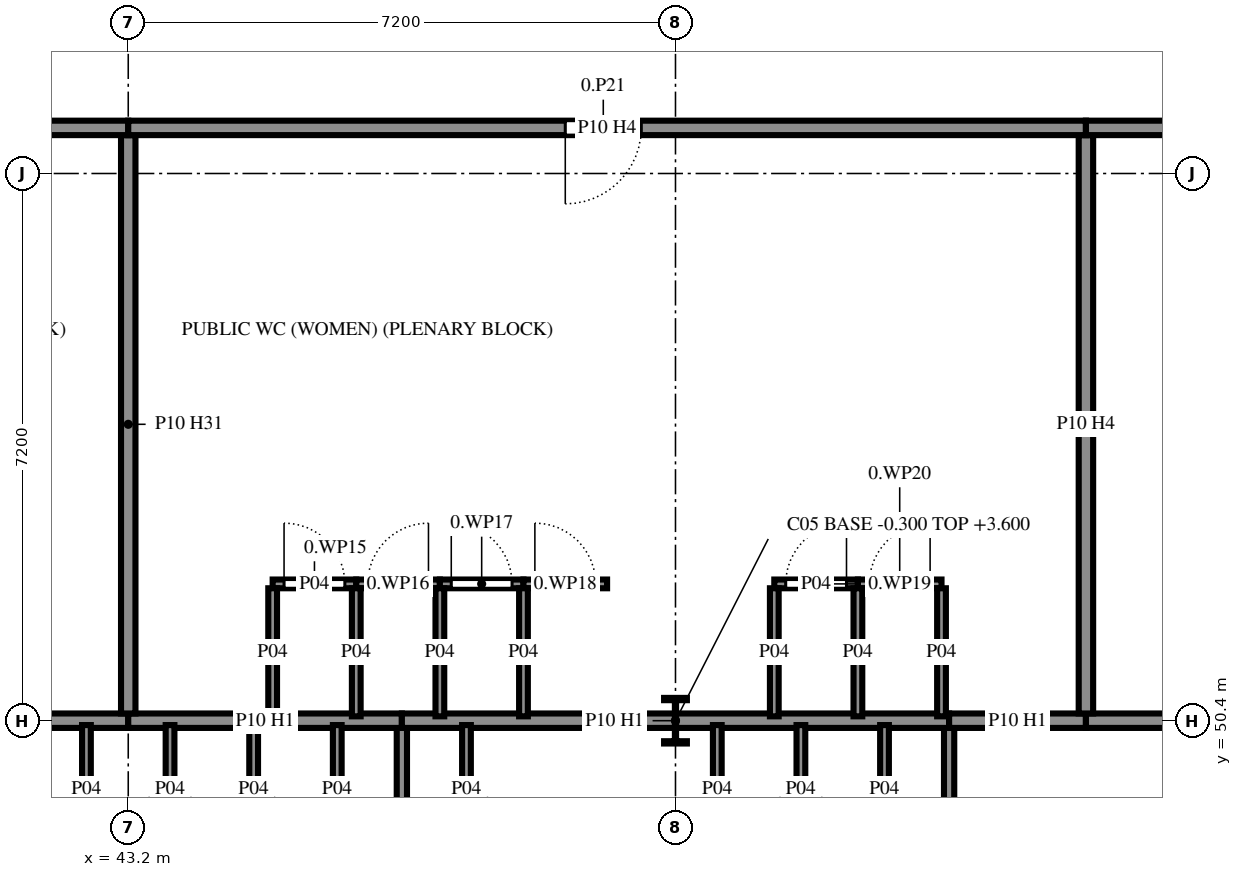
"""IFC4 building model, lengths in metres.
Left out: names, types, materials, properties, quantities, classifications, styles, units other than length and angle.
Written with IfcOpenShell. Run it as: python <this file> out.ifc"""

import sys

from ifc_helpers import new_model, si_unit, direction, frame, frame_2d, origin, origin_2d, place, context, subcontext, project, spatial, rectangle, i_section, extrude, element, fill, save


model = new_model("IFC4")
c1 = context("Model", 3, precision=1e-05, world=origin(), true_north=direction((0.0, 1.0)))
c2 = subcontext(c1, "Body", "Model", "MODEL_VIEW")
j1 = project(units=[si_unit("LENGTHUNIT", "METRE"), si_unit("PLANEANGLEUNIT", "RADIAN")], contexts=[c1])
p1 = place(None, origin())
s1 = spatial("IfcSite", under=j1, at=p1, CompositionType="ELEMENT")
p2 = place(p1, origin())
s2 = spatial("IfcBuilding", under=s1, at=p2, CompositionType="ELEMENT")
p3 = place(p2, origin())
s3 = spatial("IfcBuildingStorey", under=s2, at=p3, CompositionType="ELEMENT", Elevation=0.0)
p4 = place(p3, frame((50.4, 50.4, -0.3), z_axis=(0.0, 0.0, 1.0), x_axis=(1.0, 0.0, 0.0)))
e1 = element("IfcColumn", 1, at=p4, inside=s3, PredefinedType="COLUMN", context=c2, shape_type="SweptSolid", body=[
    extrude(i_section(OverallWidth=0.3, OverallDepth=0.6, WebThickness=0.015, FlangeThickness=0.03, FilletRadius=0.027, at=origin_2d()), origin(), (0.0, 0.0, 1.0), 3.9),
])
p5 = place(p3, frame((46.8, 50.305, 0.0), z_axis=(0.0, 0.0, 1.0), x_axis=(0.0, -1.0, 0.0)))
e2 = element("IfcWall", 2, at=p5, inside=s3, PredefinedType="PARTITIONING", context=c2, shape_type="SweptSolid", body=[
    extrude(rectangle(XDim=7.037, YDim=0.135, at=frame_2d((3.519, 0.0))), origin(), (0.0, 0.0, 1.0), 3.12),
])
p6 = place(p3, frame((39.6, 50.4, 0.0), z_axis=(0.0, 0.0, 1.0), x_axis=(1.0, 0.0, 0.0)))
e3 = element("IfcWall", 3, at=p6, inside=s3, PredefinedType="PARTITIONING", context=c2, shape_type="SweptSolid", body=[
    extrude(rectangle(XDim=3.6, YDim=0.19, at=frame_2d((1.8, 0.0))), origin(), (0.0, 0.0, 1.0), 2.82),
])
p7 = place(p3, frame((43.2, 50.4, 0.0), z_axis=(0.0, 0.0, 1.0), x_axis=(1.0, 0.0, 0.0)))
e4 = element("IfcWall", 4, at=p7, inside=s3, PredefinedType="PARTITIONING", context=c2, shape_type="SweptSolid", body=[
    extrude(rectangle(XDim=3.6, YDim=0.19, at=frame_2d((1.8, 0.0))), origin(), (0.0, 0.0, 1.0), 2.82),
])
p8 = place(p3, frame((54.0, 50.305, 0.0), z_axis=(0.0, 0.0, 1.0), x_axis=(0.0, -1.0, 0.0)))
e5 = element("IfcWall", 5, at=p8, inside=s3, PredefinedType="PARTITIONING", context=c2, shape_type="SweptSolid", body=[
    extrude(rectangle(XDim=7.037, YDim=0.135, at=frame_2d((3.519, 0.0))), origin(), (0.0, 0.0, 1.0), 3.12),
])
p9 = place(p3, frame((46.8, 50.4, 0.0), z_axis=(0.0, 0.0, 1.0), x_axis=(1.0, 0.0, 0.0)))
e6 = element("IfcWall", 6, at=p9, inside=s3, PredefinedType="PARTITIONING", context=c2, shape_type="SweptSolid", body=[
    extrude(rectangle(XDim=7.2, YDim=0.19, at=frame_2d((3.6, 0.0))), origin(), (0.0, 0.0, 1.0), 2.82),
])
p10 = place(p3, frame((54.0, 50.4, 0.0), z_axis=(0.0, 0.0, 1.0), x_axis=(1.0, 0.0, 0.0)))
e7 = element("IfcWall", 7, at=p10, inside=s3, PredefinedType="PARTITIONING", context=c2, shape_type="SweptSolid", body=[
    extrude(rectangle(XDim=1.8, YDim=0.19, at=frame_2d((0.9, 0.0))), origin(), (0.0, 0.0, 1.0), 2.82),
])
p11 = place(p3, frame((55.8, 50.4, 0.0), z_axis=(0.0, 0.0, 1.0), x_axis=(1.0, 0.0, 0.0)))
e8 = element("IfcWall", 8, at=p11, inside=s3, PredefinedType="PARTITIONING", context=c2, shape_type="SweptSolid", body=[
    extrude(rectangle(XDim=5.4, YDim=0.19, at=frame_2d((2.7, 0.0))), origin(), (0.0, 0.0, 1.0), 2.82),
])
p12 = place(p3, frame((43.2, 58.105, 0.0), z_axis=(0.0, 0.0, 1.0), x_axis=(0.0, -1.0, 0.0)))
e9 = element("IfcWall", 9, at=p12, inside=s3, PredefinedType="PARTITIONING", context=c2, shape_type="SweptSolid", body=[
    extrude(rectangle(XDim=7.61, YDim=0.19, at=frame_2d((3.805, 0.0))), origin(), (0.0, 0.0, 1.0), 3.11),
])
p13 = place(p3, frame((30.6, 58.2, 0.0), z_axis=(0.0, 0.0, 1.0), x_axis=(1.0, 0.0, 0.0)))
e10 = element("IfcWall", 10, at=p13, inside=s3, PredefinedType="PARTITIONING", context=c2, shape_type="SweptSolid", body=[
    extrude(rectangle(XDim=12.6, YDim=0.19, at=frame_2d((6.3, 0.0))), origin(), (0.0, 0.0, 1.0), 3.42),
])
p14 = place(p13, frame((5.75, 0.0, 0.0)))
e11 = element("IfcOpeningElement", 11, at=p14, cuts=e10, PredefinedType="OPENING", context=c2, shape_type="SweptSolid", body=[
    extrude(rectangle(XDim=1.0, YDim=2.4, at=frame_2d((0.5, 1.2))), frame((0.0, 0.105, 0.0), z_axis=(0.0, -1.0, 0.0), x_axis=(1.0, 0.0, 0.0)), (0.0, 0.0, 1.0), 0.21),
])
p15 = place(p3, frame((55.8, 58.105, 0.0), z_axis=(0.0, 0.0, 1.0), x_axis=(0.0, -1.0, 0.0)))
e12 = element("IfcWall", 12, at=p15, inside=s3, PredefinedType="PARTITIONING", context=c2, shape_type="SweptSolid", body=[
    extrude(rectangle(XDim=7.61, YDim=0.19, at=frame_2d((3.805, 0.0))), origin(), (0.0, 0.0, 1.0), 3.42),
])
p16 = place(p3, frame((43.2, 58.2, 0.0), z_axis=(0.0, 0.0, 1.0), x_axis=(1.0, 0.0, 0.0)))
e13 = element("IfcWall", 13, at=p16, inside=s3, PredefinedType="PARTITIONING", context=c2, shape_type="SweptSolid", body=[
    extrude(rectangle(XDim=12.6, YDim=0.19, at=frame_2d((6.3, 0.0))), origin(), (0.0, 0.0, 1.0), 3.42),
])
p17 = place(p16, frame((5.75, 0.0, 0.0)))
e14 = element("IfcOpeningElement", 14, at=p17, cuts=e13, PredefinedType="OPENING", context=c2, shape_type="SweptSolid", body=[
    extrude(rectangle(XDim=1.0, YDim=2.4, at=frame_2d((0.5, 1.2))), frame((0.0, 0.105, 0.0), z_axis=(0.0, -1.0, 0.0), x_axis=(1.0, 0.0, 0.0)), (0.0, 0.0, 1.0), 0.21),
])
p18 = place(p3, frame((55.8, 58.2, 0.0), z_axis=(0.0, 0.0, 1.0), x_axis=(1.0, 0.0, 0.0)))
e15 = element("IfcWall", 15, at=p18, inside=s3, PredefinedType="PARTITIONING", context=c2, shape_type="SweptSolid", body=[
    extrude(rectangle(XDim=12.695, YDim=0.19, at=frame_2d((6.348, 0.0))), origin(), (0.0, 0.0, 1.0), 3.42),
])
p19 = place(p18, frame((5.85, 0.0, 0.0)))
e16 = element("IfcOpeningElement", 16, at=p19, cuts=e15, PredefinedType="OPENING", context=c2, shape_type="SweptSolid", body=[
    extrude(rectangle(XDim=1.0, YDim=2.4, at=frame_2d((0.5, 1.2))), frame((0.0, 0.105, 0.0), z_axis=(0.0, -1.0, 0.0), x_axis=(1.0, 0.0, 0.0)), (0.0, 0.0, 1.0), 0.21),
])
for number, where, z_axis, x_axis in (
    (17, (42.65, 50.343, 0.0), (0.0, 0.0, 1.0), (0.0, -1.0, 0.0)),
    (18, (43.75, 50.343, 0.0), (0.0, 0.0, 1.0), (0.0, -1.0, 0.0)),
    (19, (44.85, 50.343, 0.0), (0.0, 0.0, 1.0), (0.0, -1.0, 0.0)),
    (20, (45.95, 50.343, 0.0), (0.0, 0.0, 1.0), (0.0, -1.0, 0.0)),
    (21, (47.65, 50.343, 0.0), (0.0, 0.0, 1.0), (0.0, -1.0, 0.0)),
    (22, (50.95, 50.343, 0.0), (0.0, 0.0, 1.0), (0.0, -1.0, 0.0)),
    (23, (52.05, 50.343, 0.0), (0.0, 0.0, 1.0), (0.0, -1.0, 0.0)),
    (24, (53.15, 50.343, 0.0), (0.0, 0.0, 1.0), (0.0, -1.0, 0.0)),
):
    element("IfcWall", number, at=place(p3, frame(where, z_axis=z_axis, x_axis=x_axis)), inside=s3, PredefinedType="PARTITIONING", context=c2, shape_type="SweptSolid", body=[
        extrude(rectangle(XDim=1.685, YDim=0.115, at=frame_2d((0.843, 0.0))), origin(), (0.0, 0.0, 1.0), 3.42),
    ])
p20 = place(p3, frame((45.1, 52.2, 0.0), z_axis=(0.0, 0.0, 1.0), x_axis=(1.0, 0.0, 0.0)))
e25 = element("IfcWall", 25, at=p20, inside=s3, PredefinedType="PARTITIONING", context=c2, shape_type="SweptSolid", body=[
    extrude(rectangle(XDim=1.1, YDim=0.115, at=frame_2d((0.55, 0.0))), origin(), (0.0, 0.0, 1.0), 3.42),
])
p21 = place(p20, frame((0.15, 0.0, 0.0)))
e26 = element("IfcOpeningElement", 26, at=p21, cuts=e25, PredefinedType="OPENING", context=c2, shape_type="SweptSolid", body=[
    extrude(rectangle(XDim=0.8, YDim=2.1, at=frame_2d((0.4, 1.05))), frame((0.0, 0.067, 0.0), z_axis=(0.0, -1.0, 0.0), x_axis=(1.0, 0.0, 0.0)), (0.0, 0.0, 1.0), 0.135),
])
p22 = place(p3, frame((45.1, 50.458, 0.0), z_axis=(0.0, 0.0, 1.0), x_axis=(0.0, 1.0, 0.0)))
e27 = element("IfcWall", 27, at=p22, inside=s3, PredefinedType="PARTITIONING", context=c2, shape_type="SweptSolid", body=[
    extrude(rectangle(XDim=1.685, YDim=0.115, at=frame_2d((0.843, 0.0))), origin(), (0.0, 0.0, 1.0), 3.42),
])
p23 = place(p3, frame((46.2, 52.2, 0.0), z_axis=(0.0, 0.0, 1.0), x_axis=(1.0, 0.0, 0.0)))
e28 = element("IfcWall", 28, at=p23, inside=s3, PredefinedType="PARTITIONING", context=c2, shape_type="SweptSolid", body=[
    extrude(rectangle(XDim=1.1, YDim=0.115, at=frame_2d((0.55, 0.0))), origin(), (0.0, 0.0, 1.0), 3.42),
])
p24 = place(p23, frame((0.15, 0.0, 0.0)))
e29 = element("IfcOpeningElement", 29, at=p24, cuts=e28, PredefinedType="OPENING", context=c2, shape_type="SweptSolid", body=[
    extrude(rectangle(XDim=0.8, YDim=2.1, at=frame_2d((0.4, 1.05))), frame((0.0, 0.067, 0.0), z_axis=(0.0, -1.0, 0.0), x_axis=(1.0, 0.0, 0.0)), (0.0, 0.0, 1.0), 0.135),
])
p25 = place(p3, frame((46.2, 50.458, 0.0), z_axis=(0.0, 0.0, 1.0), x_axis=(0.0, 1.0, 0.0)))
e30 = element("IfcWall", 30, at=p25, inside=s3, PredefinedType="PARTITIONING", context=c2, shape_type="SweptSolid", body=[
    extrude(rectangle(XDim=1.685, YDim=0.115, at=frame_2d((0.843, 0.0))), origin(), (0.0, 0.0, 1.0), 3.42),
])
p26 = place(p3, frame((47.3, 52.2, 0.0), z_axis=(0.0, 0.0, 1.0), x_axis=(1.0, 0.0, 0.0)))
e31 = element("IfcWall", 31, at=p26, inside=s3, PredefinedType="PARTITIONING", context=c2, shape_type="SweptSolid", body=[
    extrude(rectangle(XDim=1.1, YDim=0.115, at=frame_2d((0.55, 0.0))), origin(), (0.0, 0.0, 1.0), 3.42),
])
p27 = place(p26, frame((0.15, 0.0, 0.0)))
e32 = element("IfcOpeningElement", 32, at=p27, cuts=e31, PredefinedType="OPENING", context=c2, shape_type="SweptSolid", body=[
    extrude(rectangle(XDim=0.8, YDim=2.1, at=frame_2d((0.4, 1.05))), frame((0.0, 0.067, 0.0), z_axis=(0.0, -1.0, 0.0), x_axis=(1.0, 0.0, 0.0)), (0.0, 0.0, 1.0), 0.135),
])
p28 = place(p3, frame((47.3, 50.458, 0.0), z_axis=(0.0, 0.0, 1.0), x_axis=(0.0, 1.0, 0.0)))
e33 = element("IfcWall", 33, at=p28, inside=s3, PredefinedType="PARTITIONING", context=c2, shape_type="SweptSolid", body=[
    extrude(rectangle(XDim=1.685, YDim=0.115, at=frame_2d((0.843, 0.0))), origin(), (0.0, 0.0, 1.0), 3.42),
])
p29 = place(p3, frame((48.4, 52.2, 0.0), z_axis=(0.0, 0.0, 1.0), x_axis=(1.0, 0.0, 0.0)))
e34 = element("IfcWall", 34, at=p29, inside=s3, PredefinedType="PARTITIONING", context=c2, shape_type="SweptSolid", body=[
    extrude(rectangle(XDim=1.1, YDim=0.115, at=frame_2d((0.55, 0.0))), origin(), (0.0, 0.0, 1.0), 3.42),
])
p30 = place(p29, frame((0.15, 0.0, 0.0)))
e35 = element("IfcOpeningElement", 35, at=p30, cuts=e34, PredefinedType="OPENING", context=c2, shape_type="SweptSolid", body=[
    extrude(rectangle(XDim=0.8, YDim=2.1, at=frame_2d((0.4, 1.05))), frame((0.0, 0.067, 0.0), z_axis=(0.0, -1.0, 0.0), x_axis=(1.0, 0.0, 0.0)), (0.0, 0.0, 1.0), 0.135),
])
p31 = place(p3, frame((48.4, 50.458, 0.0), z_axis=(0.0, 0.0, 1.0), x_axis=(0.0, 1.0, 0.0)))
e36 = element("IfcWall", 36, at=p31, inside=s3, PredefinedType="PARTITIONING", context=c2, shape_type="SweptSolid", body=[
    extrude(rectangle(XDim=1.685, YDim=0.115, at=frame_2d((0.843, 0.0))), origin(), (0.0, 0.0, 1.0), 3.42),
])
p32 = place(p3, frame((51.7, 52.2, 0.0), z_axis=(0.0, 0.0, 1.0), x_axis=(1.0, 0.0, 0.0)))
e37 = element("IfcWall", 37, at=p32, inside=s3, PredefinedType="PARTITIONING", context=c2, shape_type="SweptSolid", body=[
    extrude(rectangle(XDim=1.1, YDim=0.115, at=frame_2d((0.55, 0.0))), origin(), (0.0, 0.0, 1.0), 3.42),
])
p33 = place(p32, frame((0.15, 0.0, 0.0)))
e38 = element("IfcOpeningElement", 38, at=p33, cuts=e37, PredefinedType="OPENING", context=c2, shape_type="SweptSolid", body=[
    extrude(rectangle(XDim=0.8, YDim=2.1, at=frame_2d((0.4, 1.05))), frame((0.0, 0.067, 0.0), z_axis=(0.0, -1.0, 0.0), x_axis=(1.0, 0.0, 0.0)), (0.0, 0.0, 1.0), 0.135),
])
p34 = place(p3, frame((51.7, 50.458, 0.0), z_axis=(0.0, 0.0, 1.0), x_axis=(0.0, 1.0, 0.0)))
e39 = element("IfcWall", 39, at=p34, inside=s3, PredefinedType="PARTITIONING", context=c2, shape_type="SweptSolid", body=[
    extrude(rectangle(XDim=1.685, YDim=0.115, at=frame_2d((0.843, 0.0))), origin(), (0.0, 0.0, 1.0), 3.42),
])
p35 = place(p3, frame((52.8, 52.2, 0.0), z_axis=(0.0, 0.0, 1.0), x_axis=(1.0, 0.0, 0.0)))
e40 = element("IfcWall", 40, at=p35, inside=s3, PredefinedType="PARTITIONING", context=c2, shape_type="SweptSolid", body=[
    extrude(rectangle(XDim=1.1, YDim=0.115, at=frame_2d((0.55, 0.0))), origin(), (0.0, 0.0, 1.0), 3.42),
])
p36 = place(p35, frame((0.15, 0.0, 0.0)))
e41 = element("IfcOpeningElement", 41, at=p36, cuts=e40, PredefinedType="OPENING", context=c2, shape_type="SweptSolid", body=[
    extrude(rectangle(XDim=0.8, YDim=2.1, at=frame_2d((0.4, 1.05))), frame((0.0, 0.067, 0.0), z_axis=(0.0, -1.0, 0.0), x_axis=(1.0, 0.0, 0.0)), (0.0, 0.0, 1.0), 0.135),
])
for number, where, z_axis, x_axis in (
    (42, (52.8, 50.458, 0.0), (0.0, 0.0, 1.0), (0.0, 1.0, 0.0)),
    (43, (53.9, 50.458, 0.0), (0.0, 0.0, 1.0), (0.0, 1.0, 0.0)),
):
    element("IfcWall", number, at=place(p3, frame(where, z_axis=z_axis, x_axis=x_axis)), inside=s3, PredefinedType="PARTITIONING", context=c2, shape_type="SweptSolid", body=[
        extrude(rectangle(XDim=1.685, YDim=0.115, at=frame_2d((0.843, 0.0))), origin(), (0.0, 0.0, 1.0), 3.42),
    ])
p37 = place(p17, frame((1.0, 0.0, 0.0), z_axis=(0.0, 0.0, 1.0), x_axis=(-1.0, 0.0, 0.0)))
e44 = element("IfcDoor", 44, at=p37, inside=s3, OperationType="SINGLE_SWING_LEFT", PredefinedType="DOOR", context=c2, shape_type="SweptSolid", body=[
    extrude(rectangle(XDim=1.0, YDim=2.4, at=frame_2d((0.5, 1.2))), frame((0.0, 0.025, 0.0), z_axis=(0.0, -1.0, 0.0), x_axis=(1.0, 0.0, 0.0)), (0.0, 0.0, 1.0), 0.05),
])
fill(e14, e44)
p38 = place(p21, origin())
e45 = element("IfcDoor", 45, at=p38, inside=s3, OperationType="SINGLE_SWING_RIGHT", PredefinedType="DOOR", context=c2, shape_type="SweptSolid", body=[
    extrude(rectangle(XDim=0.8, YDim=2.1, at=frame_2d((0.4, 1.05))), frame((0.0, 0.025, 0.0), z_axis=(0.0, -1.0, 0.0), x_axis=(1.0, 0.0, 0.0)), (0.0, 0.0, 1.0), 0.05),
])
fill(e26, e45)
p39 = place(p24, origin())
e46 = element("IfcDoor", 46, at=p39, inside=s3, OperationType="SINGLE_SWING_LEFT", PredefinedType="DOOR", context=c2, shape_type="SweptSolid", body=[
    extrude(rectangle(XDim=0.8, YDim=2.1, at=frame_2d((0.4, 1.05))), frame((0.0, 0.025, 0.0), z_axis=(0.0, -1.0, 0.0), x_axis=(1.0, 0.0, 0.0)), (0.0, 0.0, 1.0), 0.05),
])
fill(e29, e46)
p40 = place(p27, origin())
e47 = element("IfcDoor", 47, at=p40, inside=s3, OperationType="SINGLE_SWING_RIGHT", PredefinedType="DOOR", context=c2, shape_type="SweptSolid", body=[
    extrude(rectangle(XDim=0.8, YDim=2.1, at=frame_2d((0.4, 1.05))), frame((0.0, 0.025, 0.0), z_axis=(0.0, -1.0, 0.0), x_axis=(1.0, 0.0, 0.0)), (0.0, 0.0, 1.0), 0.05),
])
fill(e32, e47)
p41 = place(p30, origin())
e48 = element("IfcDoor", 48, at=p41, inside=s3, OperationType="SINGLE_SWING_RIGHT", PredefinedType="DOOR", context=c2, shape_type="SweptSolid", body=[
    extrude(rectangle(XDim=0.8, YDim=2.1, at=frame_2d((0.4, 1.05))), frame((0.0, 0.025, 0.0), z_axis=(0.0, -1.0, 0.0), x_axis=(1.0, 0.0, 0.0)), (0.0, 0.0, 1.0), 0.05),
])
fill(e35, e48)
p42 = place(p33, origin())
e49 = element("IfcDoor", 49, at=p42, inside=s3, OperationType="SINGLE_SWING_LEFT", PredefinedType="DOOR", context=c2, shape_type="SweptSolid", body=[
    extrude(rectangle(XDim=0.8, YDim=2.1, at=frame_2d((0.4, 1.05))), frame((0.0, 0.025, 0.0), z_axis=(0.0, -1.0, 0.0), x_axis=(1.0, 0.0, 0.0)), (0.0, 0.0, 1.0), 0.05),
])
fill(e38, e49)
p43 = place(p36, origin())
e50 = element("IfcDoor", 50, at=p43, inside=s3, OperationType="SINGLE_SWING_LEFT", PredefinedType="DOOR", context=c2, shape_type="SweptSolid", body=[
    extrude(rectangle(XDim=0.8, YDim=2.1, at=frame_2d((0.4, 1.05))), frame((0.0, 0.025, 0.0), z_axis=(0.0, -1.0, 0.0), x_axis=(1.0, 0.0, 0.0)), (0.0, 0.0, 1.0), 0.05),
])
fill(e41, e50)
save(model, sys.argv[1])
